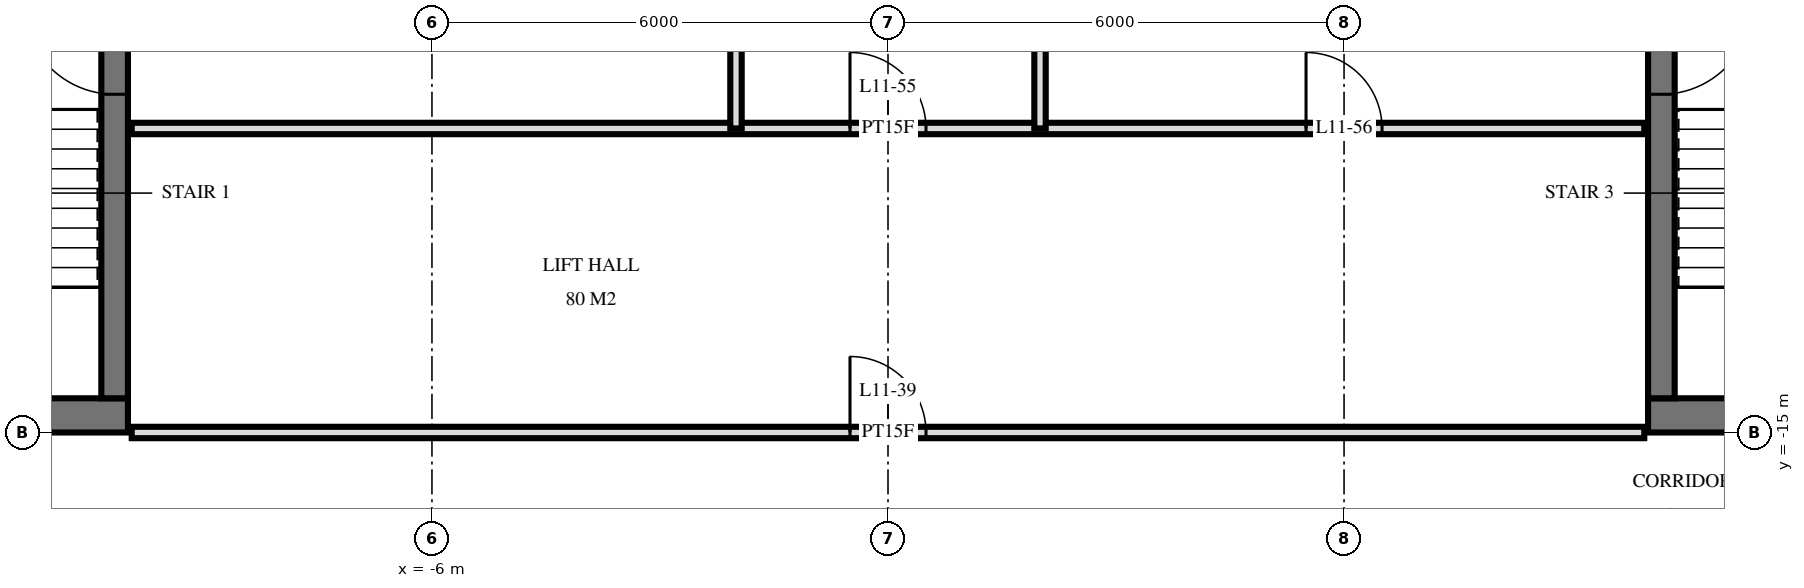
"""IFC4 building model, lengths in metres.
Left out: names, types, materials, properties, quantities, classifications, styles, units other than length and angle.
Written with IfcOpenShell. Run it as: python <this file> out.ifc"""

import sys

from ifc_helpers import new_model, si_unit, direction, frame, frame_2d, origin, place, context, subcontext, project, spatial, rectangle, extrude, element, fill, save


model = new_model("IFC4")
c1 = context("Model", 3, precision=1e-05, world=origin(), true_north=direction((0.0, 1.0)))
c2 = subcontext(c1, "Body", "Model", "MODEL_VIEW")
j1 = project(units=[si_unit("LENGTHUNIT", "METRE"), si_unit("PLANEANGLEUNIT", "RADIAN")], contexts=[c1])
p1 = place(None, origin())
s1 = spatial("IfcSite", under=j1, at=p1, CompositionType="ELEMENT")
p2 = place(p1, origin())
s2 = spatial("IfcBuilding", under=s1, at=p2, CompositionType="ELEMENT")
p3 = place(p2, frame((0.0, 0.0, 49.2)))
s3 = spatial("IfcBuildingStorey", under=s2, at=p3, CompositionType="ELEMENT", Elevation=49.2)
p4 = place(p3, frame((-29.5, -14.775, 0.0), z_axis=(0.0, 0.0, 1.0), x_axis=(1.0, 0.0, 0.0)))
e1 = element("IfcWall", 1, at=p4, inside=s3, PredefinedType="SHEAR", context=c2, shape_type="SweptSolid", body=[
    extrude(rectangle(XDim=19.5, YDim=0.45, at=frame_2d((9.75, 0.0))), origin(), (0.0, 0.0, 1.0), 3.6),
])
p5 = place(p4, frame((11.2, 0.0, 0.0)))
e2 = element("IfcOpeningElement", 2, at=p5, cuts=e1, PredefinedType="OPENING", context=c2, shape_type="SweptSolid", body=[
    extrude(rectangle(XDim=1.2, YDim=2.1, at=frame_2d((0.6, 1.05))), frame((0.0, 0.235, 0.0), z_axis=(0.0, -1.0, 0.0), x_axis=(1.0, 0.0, 0.0)), (0.0, 0.0, 1.0), 0.47),
])
p6 = place(p4, frame((14.25, 0.0, 0.0)))
e3 = element("IfcOpeningElement", 3, at=p6, cuts=e1, PredefinedType="OPENING", context=c2, shape_type="SweptSolid", body=[
    extrude(rectangle(XDim=1.1, YDim=2.1, at=frame_2d((0.55, 1.05))), frame((0.0, 0.235, 0.0), z_axis=(0.0, -1.0, 0.0), x_axis=(1.0, 0.0, 0.0)), (0.0, 0.0, 1.0), 0.47),
])
p7 = place(p4, frame((8.5, 0.0, 0.0)))
e4 = element("IfcOpeningElement", 4, at=p7, cuts=e1, PredefinedType="OPENING", context=c2, shape_type="SweptSolid", body=[
    extrude(rectangle(XDim=0.9, YDim=2.1, at=frame_2d((0.45, 1.05))), frame((0.0, 0.235, 0.0), z_axis=(0.0, -1.0, 0.0), x_axis=(1.0, 0.0, 0.0)), (0.0, 0.0, 1.0), 0.47),
])
p8 = place(p4, frame((6.05, 0.0, 0.0)))
e5 = element("IfcOpeningElement", 5, at=p8, cuts=e1, PredefinedType="OPENING", context=c2, shape_type="SweptSolid", body=[
    extrude(rectangle(XDim=1.0, YDim=2.1, at=frame_2d((0.5, 1.05))), frame((0.0, 0.235, 0.0), z_axis=(0.0, -1.0, 0.0), x_axis=(1.0, 0.0, 0.0)), (0.0, 0.0, 1.0), 0.47),
])
p9 = place(p4, frame((3.587, 0.0, 0.0)))
e6 = element("IfcOpeningElement", 6, at=p9, cuts=e1, PredefinedType="OPENING", context=c2, shape_type="SweptSolid", body=[
    extrude(rectangle(XDim=1.0, YDim=2.1, at=frame_2d((0.5, 1.05))), frame((0.0, 0.235, 0.0), z_axis=(0.0, -1.0, 0.0), x_axis=(1.0, 0.0, 0.0)), (0.0, 0.0, 1.0), 0.47),
])
p10 = place(p4, frame((1.85, 0.0, 0.0)))
e7 = element("IfcOpeningElement", 7, at=p10, cuts=e1, PredefinedType="OPENING", context=c2, shape_type="SweptSolid", body=[
    extrude(rectangle(XDim=1.0, YDim=2.1, at=frame_2d((0.5, 1.05))), frame((0.0, 0.235, 0.0), z_axis=(0.0, -1.0, 0.0), x_axis=(1.0, 0.0, 0.0)), (0.0, 0.0, 1.0), 0.47),
])
p11 = place(p4, frame((0.55, 0.0, 0.0)))
e8 = element("IfcOpeningElement", 8, at=p11, cuts=e1, PredefinedType="OPENING", context=c2, shape_type="SweptSolid", body=[
    extrude(rectangle(XDim=1.0, YDim=2.1, at=frame_2d((0.5, 1.05))), frame((0.0, 0.235, 0.0), z_axis=(0.0, -1.0, 0.0), x_axis=(1.0, 0.0, 0.0)), (0.0, 0.0, 1.0), 0.47),
])
p12 = place(p3, frame((-10.175, -14.55, 0.0), z_axis=(0.0, 0.0, 1.0), x_axis=(0.0, 1.0, 0.0)))
e9 = element("IfcWall", 9, at=p12, inside=s3, PredefinedType="SHEAR", context=c2, shape_type="SweptSolid", body=[
    extrude(rectangle(XDim=14.1, YDim=0.35, at=frame_2d((7.05, 0.0))), origin(), (0.0, 0.0, 1.0), 3.6),
])
p13 = place(p12, frame((8.4, 0.0, 0.0)))
e10 = element("IfcOpeningElement", 10, at=p13, cuts=e9, PredefinedType="OPENING", context=c2, shape_type="SweptSolid", body=[
    extrude(rectangle(XDim=1.4, YDim=2.4, at=frame_2d((0.7, 1.2))), frame((0.0, 0.185, 0.0), z_axis=(0.0, -1.0, 0.0), x_axis=(1.0, 0.0, 0.0)), (0.0, 0.0, 1.0), 0.37),
])
p14 = place(p12, frame((10.0, 0.0, 0.0)))
e11 = element("IfcOpeningElement", 11, at=p14, cuts=e9, PredefinedType="OPENING", context=c2, shape_type="SweptSolid", body=[
    extrude(rectangle(XDim=1.4, YDim=2.4, at=frame_2d((0.7, 1.2))), frame((0.0, 0.185, 0.0), z_axis=(0.0, -1.0, 0.0), x_axis=(1.0, 0.0, 0.0)), (0.0, 0.0, 1.0), 0.37),
])
p15 = place(p12, frame((4.0, 0.0, 0.0)))
e12 = element("IfcOpeningElement", 12, at=p15, cuts=e9, PredefinedType="OPENING", context=c2, shape_type="SweptSolid", body=[
    extrude(rectangle(XDim=1.2, YDim=2.1, at=frame_2d((0.6, 1.05))), frame((0.0, 0.185, 0.0), z_axis=(0.0, -1.0, 0.0), x_axis=(1.0, 0.0, 0.0)), (0.0, 0.0, 1.0), 0.37),
])
p16 = place(p3, frame((10.0, -14.775, 0.0), z_axis=(0.0, 0.0, 1.0), x_axis=(1.0, 0.0, 0.0)))
e13 = element("IfcWall", 13, at=p16, inside=s3, PredefinedType="SHEAR", context=c2, shape_type="SweptSolid", body=[
    extrude(rectangle(XDim=19.5, YDim=0.45, at=frame_2d((9.75, 0.0))), origin(), (0.0, 0.0, 1.0), 3.6),
])
p17 = place(p16, frame((7.1, 0.0, 0.0)))
e14 = element("IfcOpeningElement", 14, at=p17, cuts=e13, PredefinedType="OPENING", context=c2, shape_type="SweptSolid", body=[
    extrude(rectangle(XDim=1.2, YDim=2.1, at=frame_2d((0.6, 1.05))), frame((0.0, 0.235, 0.0), z_axis=(0.0, -1.0, 0.0), x_axis=(1.0, 0.0, 0.0)), (0.0, 0.0, 1.0), 0.47),
])
p18 = place(p16, frame((4.15, 0.0, 0.0)))
e15 = element("IfcOpeningElement", 15, at=p18, cuts=e13, PredefinedType="OPENING", context=c2, shape_type="SweptSolid", body=[
    extrude(rectangle(XDim=1.1, YDim=2.1, at=frame_2d((0.55, 1.05))), frame((0.0, 0.235, 0.0), z_axis=(0.0, -1.0, 0.0), x_axis=(1.0, 0.0, 0.0)), (0.0, 0.0, 1.0), 0.47),
])
p19 = place(p16, frame((10.1, 0.0, 0.0)))
e16 = element("IfcOpeningElement", 16, at=p19, cuts=e13, PredefinedType="OPENING", context=c2, shape_type="SweptSolid", body=[
    extrude(rectangle(XDim=0.9, YDim=2.1, at=frame_2d((0.45, 1.05))), frame((0.0, 0.235, 0.0), z_axis=(0.0, -1.0, 0.0), x_axis=(1.0, 0.0, 0.0)), (0.0, 0.0, 1.0), 0.47),
])
p20 = place(p16, frame((12.45, 0.0, 0.0)))
e17 = element("IfcOpeningElement", 17, at=p20, cuts=e13, PredefinedType="OPENING", context=c2, shape_type="SweptSolid", body=[
    extrude(rectangle(XDim=1.0, YDim=2.1, at=frame_2d((0.5, 1.05))), frame((0.0, 0.235, 0.0), z_axis=(0.0, -1.0, 0.0), x_axis=(1.0, 0.0, 0.0)), (0.0, 0.0, 1.0), 0.47),
])
p21 = place(p16, frame((14.913, 0.0, 0.0)))
e18 = element("IfcOpeningElement", 18, at=p21, cuts=e13, PredefinedType="OPENING", context=c2, shape_type="SweptSolid", body=[
    extrude(rectangle(XDim=1.0, YDim=2.1, at=frame_2d((0.5, 1.05))), frame((0.0, 0.235, 0.0), z_axis=(0.0, -1.0, 0.0), x_axis=(1.0, 0.0, 0.0)), (0.0, 0.0, 1.0), 0.47),
])
p22 = place(p16, frame((16.65, 0.0, 0.0)))
e19 = element("IfcOpeningElement", 19, at=p22, cuts=e13, PredefinedType="OPENING", context=c2, shape_type="SweptSolid", body=[
    extrude(rectangle(XDim=1.0, YDim=2.1, at=frame_2d((0.5, 1.05))), frame((0.0, 0.235, 0.0), z_axis=(0.0, -1.0, 0.0), x_axis=(1.0, 0.0, 0.0)), (0.0, 0.0, 1.0), 0.47),
])
p23 = place(p16, frame((18.025, 0.0, 0.0)))
e20 = element("IfcOpeningElement", 20, at=p23, cuts=e13, PredefinedType="OPENING", context=c2, shape_type="SweptSolid", body=[
    extrude(rectangle(XDim=1.0, YDim=2.1, at=frame_2d((0.5, 1.05))), frame((0.0, 0.235, 0.0), z_axis=(0.0, -1.0, 0.0), x_axis=(1.0, 0.0, 0.0)), (0.0, 0.0, 1.0), 0.47),
])
p24 = place(p3, frame((10.175, -14.55, 0.0), z_axis=(0.0, 0.0, 1.0), x_axis=(0.0, 1.0, 0.0)))
e21 = element("IfcWall", 21, at=p24, inside=s3, PredefinedType="SHEAR", context=c2, shape_type="SweptSolid", body=[
    extrude(rectangle(XDim=14.1, YDim=0.35, at=frame_2d((7.05, 0.0))), origin(), (0.0, 0.0, 1.0), 3.6),
])
p25 = place(p24, frame((8.4, 0.0, 0.0)))
e22 = element("IfcOpeningElement", 22, at=p25, cuts=e21, PredefinedType="OPENING", context=c2, shape_type="SweptSolid", body=[
    extrude(rectangle(XDim=1.4, YDim=2.4, at=frame_2d((0.7, 1.2))), frame((0.0, 0.185, 0.0), z_axis=(0.0, -1.0, 0.0), x_axis=(1.0, 0.0, 0.0)), (0.0, 0.0, 1.0), 0.37),
])
p26 = place(p24, frame((10.0, 0.0, 0.0)))
e23 = element("IfcOpeningElement", 23, at=p26, cuts=e21, PredefinedType="OPENING", context=c2, shape_type="SweptSolid", body=[
    extrude(rectangle(XDim=1.4, YDim=2.4, at=frame_2d((0.7, 1.2))), frame((0.0, 0.185, 0.0), z_axis=(0.0, -1.0, 0.0), x_axis=(1.0, 0.0, 0.0)), (0.0, 0.0, 1.0), 0.37),
])
p27 = place(p24, frame((4.0, 0.0, 0.0)))
e24 = element("IfcOpeningElement", 24, at=p27, cuts=e21, PredefinedType="OPENING", context=c2, shape_type="SweptSolid", body=[
    extrude(rectangle(XDim=1.2, YDim=2.1, at=frame_2d((0.6, 1.05))), frame((0.0, 0.185, 0.0), z_axis=(0.0, -1.0, 0.0), x_axis=(1.0, 0.0, 0.0)), (0.0, 0.0, 1.0), 0.37),
])
for number, where, z_axis, x_axis in (
    (25, (2.0, -11.0, 0.0), (0.0, 0.0, 1.0), (0.0, 1.0, 0.0)),
    (26, (-2.0, -11.0, 0.0), (0.0, 0.0, 1.0), (0.0, 1.0, 0.0)),
):
    element("IfcWall", number, at=place(p3, frame(where, z_axis=z_axis, x_axis=x_axis)), inside=s3, PredefinedType="PARTITIONING", context=c2, shape_type="SweptSolid", body=[
        extrude(rectangle(XDim=4.0, YDim=0.15, at=frame_2d((2.0, 0.0))), origin(), (0.0, 0.0, 1.0), 3.32),
    ])
p28 = place(p3, frame((-9.95, -15.0, 0.0), z_axis=(0.0, 0.0, 1.0), x_axis=(1.0, 0.0, 0.0)))
e27 = element("IfcWall", 27, at=p28, inside=s3, PredefinedType="PARTITIONING", context=c2, shape_type="SweptSolid", body=[
    extrude(rectangle(XDim=19.9, YDim=0.15, at=frame_2d((9.95, 0.0))), origin(), (0.0, 0.0, 1.0), 2.684),
])
p29 = place(p28, frame((9.45, 0.0, 0.0)))
e28 = element("IfcOpeningElement", 28, at=p29, cuts=e27, PredefinedType="OPENING", context=c2, shape_type="SweptSolid", body=[
    extrude(rectangle(XDim=1.0, YDim=2.1, at=frame_2d((0.5, 1.05))), frame((0.0, 0.085, 0.0), z_axis=(0.0, -1.0, 0.0), x_axis=(1.0, 0.0, 0.0)), (0.0, 0.0, 1.0), 0.17),
])
p30 = place(p3, frame((-9.95, -11.0, 0.0), z_axis=(0.0, 0.0, 1.0), x_axis=(1.0, 0.0, 0.0)))
e29 = element("IfcWall", 29, at=p30, inside=s3, PredefinedType="PARTITIONING", context=c2, shape_type="SweptSolid", body=[
    extrude(rectangle(XDim=19.9, YDim=0.15, at=frame_2d((9.95, 0.0))), origin(), (0.0, 0.0, 1.0), 3.32),
])
p31 = place(p30, frame((9.45, 0.0, 0.0)))
e30 = element("IfcOpeningElement", 30, at=p31, cuts=e29, PredefinedType="OPENING", context=c2, shape_type="SweptSolid", body=[
    extrude(rectangle(XDim=1.0, YDim=2.1, at=frame_2d((0.5, 1.05))), frame((0.0, 0.085, 0.0), z_axis=(0.0, -1.0, 0.0), x_axis=(1.0, 0.0, 0.0)), (0.0, 0.0, 1.0), 0.17),
])
p32 = place(p30, frame((15.45, 0.0, 0.0)))
e31 = element("IfcOpeningElement", 31, at=p32, cuts=e29, PredefinedType="OPENING", context=c2, shape_type="SweptSolid", body=[
    extrude(rectangle(XDim=1.0, YDim=2.1, at=frame_2d((0.5, 1.05))), frame((0.0, 0.085, 0.0), z_axis=(0.0, -1.0, 0.0), x_axis=(1.0, 0.0, 0.0)), (0.0, 0.0, 1.0), 0.17),
])
p33 = place(p15, origin())
e32 = element("IfcDoor", 32, at=p33, inside=s3, OperationType="SINGLE_SWING_LEFT", PredefinedType="DOOR", context=c2, shape_type="SweptSolid", body=[
    extrude(rectangle(XDim=1.2, YDim=2.1, at=frame_2d((0.6, 1.05))), frame((0.0, 0.025, 0.0), z_axis=(0.0, -1.0, 0.0), x_axis=(1.0, 0.0, 0.0)), (0.0, 0.0, 1.0), 0.05),
])
fill(e12, e32)
p34 = place(p27, frame((0.6, 0.0, 0.0), z_axis=(0.0, 0.0, 1.0), x_axis=(-1.0, 0.0, 0.0)))
e33 = element("IfcDoor", 33, at=p34, inside=s3, OperationType="SINGLE_SWING_RIGHT", PredefinedType="DOOR", context=c2, shape_type="SweptSolid", body=[
    extrude(rectangle(XDim=1.2, YDim=2.1, at=frame_2d((0.0, 1.05))), frame((0.0, -0.025, 0.0), z_axis=(0.0, 1.0, 0.0), x_axis=(-1.0, 0.0, 0.0)), (0.0, 0.0, 1.0), 0.05),
])
fill(e24, e33)
p35 = place(p29, origin())
e34 = element("IfcDoor", 34, at=p35, inside=s3, OperationType="SINGLE_SWING_RIGHT", PredefinedType="DOOR", context=c2, shape_type="SweptSolid", body=[
    extrude(rectangle(XDim=1.0, YDim=2.1, at=frame_2d((0.5, 1.05))), frame((0.0, 0.025, 0.0), z_axis=(0.0, -1.0, 0.0), x_axis=(1.0, 0.0, 0.0)), (0.0, 0.0, 1.0), 0.05),
])
fill(e28, e34)
p36 = place(p31, origin())
e35 = element("IfcDoor", 35, at=p36, inside=s3, OperationType="SINGLE_SWING_RIGHT", PredefinedType="DOOR", context=c2, shape_type="SweptSolid", body=[
    extrude(rectangle(XDim=1.0, YDim=2.1, at=frame_2d((0.5, 1.05))), frame((0.0, 0.025, 0.0), z_axis=(0.0, -1.0, 0.0), x_axis=(1.0, 0.0, 0.0)), (0.0, 0.0, 1.0), 0.05),
])
fill(e30, e35)
p37 = place(p32, origin())
e36 = element("IfcDoor", 36, at=p37, inside=s3, OperationType="SINGLE_SWING_RIGHT", PredefinedType="DOOR", context=c2, shape_type="SweptSolid", body=[
    extrude(rectangle(XDim=1.0, YDim=2.1, at=frame_2d((0.5, 1.05))), frame((0.0, 0.025, 0.0), z_axis=(0.0, -1.0, 0.0), x_axis=(1.0, 0.0, 0.0)), (0.0, 0.0, 1.0), 0.05),
])
fill(e31, e36)
save(model, sys.argv[1])
